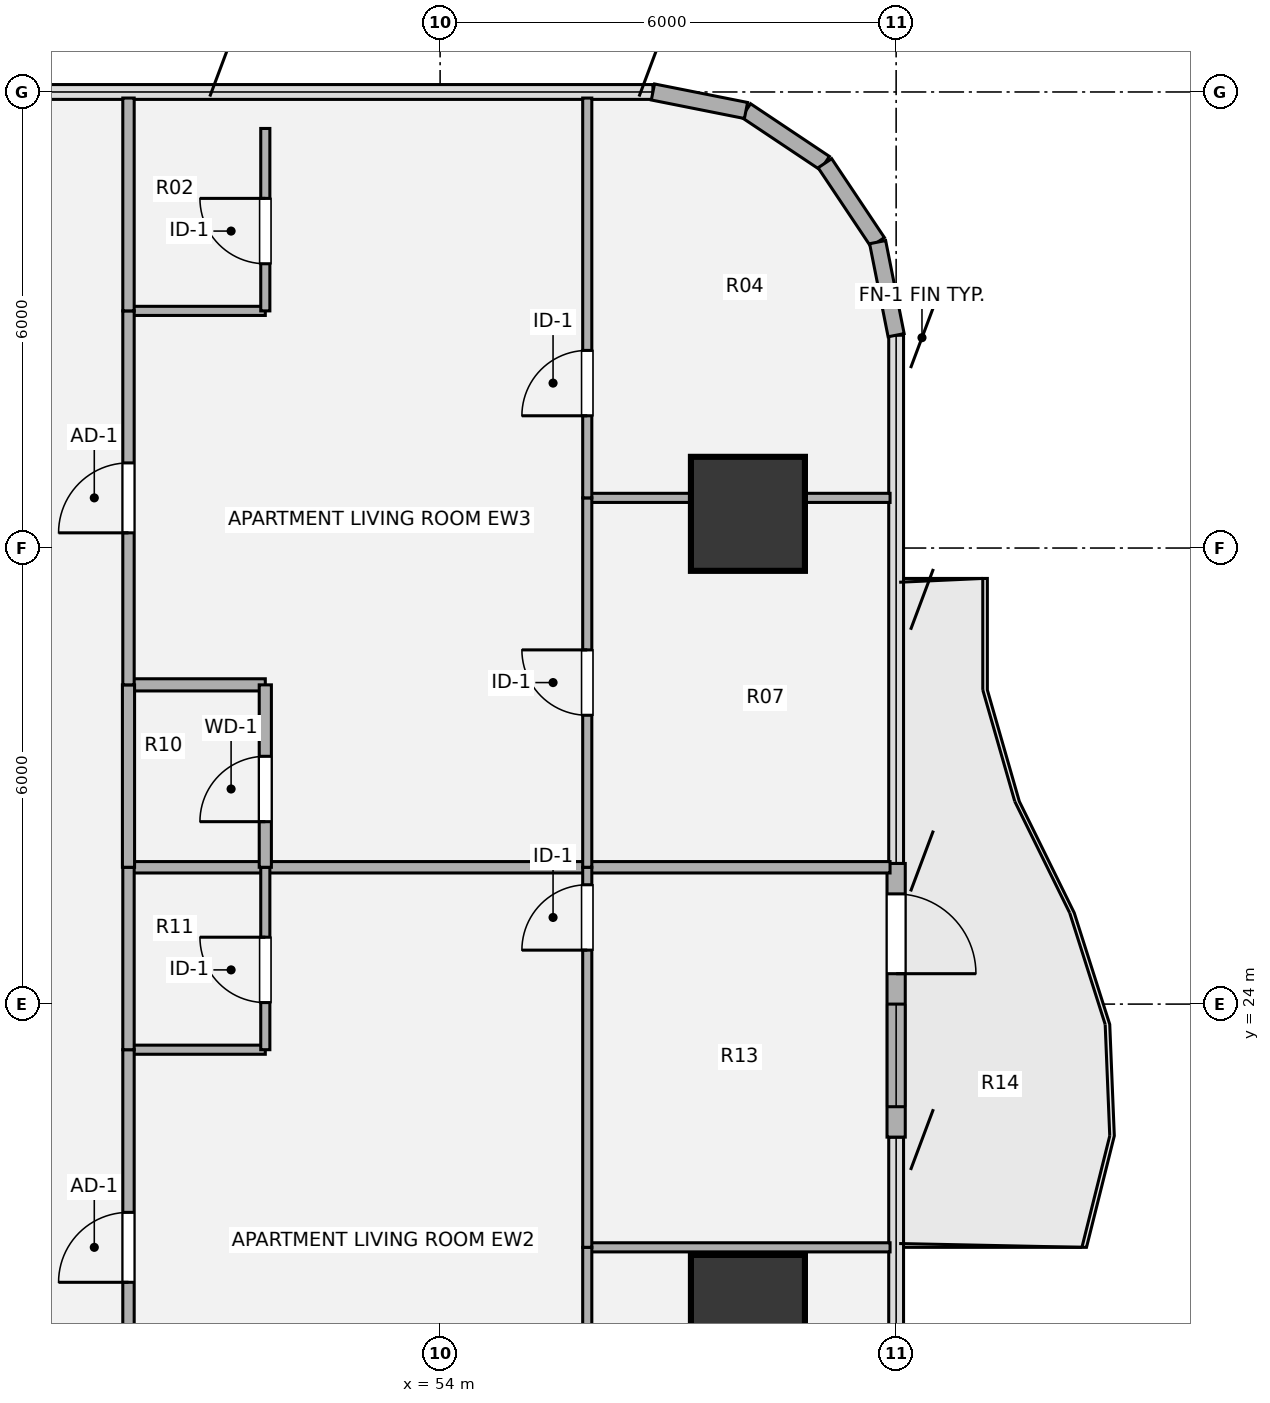
"""IFC4 building model, lengths in metres.
Left out: names, types, materials, properties, quantities, classifications, styles, units other than length and angle.
Written with IfcOpenShell. Run it as: python <this file> out.ifc"""

import sys

from ifc_helpers import new_model, si_unit, direction, frame, frame_2d, origin, origin_2d, place, context, subcontext, project, spatial, rectangle, hollow_circle, extrude, source, transform, mapped, element, fill, save


model = new_model("IFC4")
c1 = context("Model", 3, precision=1e-05, world=origin(), true_north=direction((0.0, 1.0)))
c2 = subcontext(c1, "Body", "Model", "MODEL_VIEW")
j1 = project(units=[si_unit("LENGTHUNIT", "METRE"), si_unit("PLANEANGLEUNIT", "RADIAN")], contexts=[c1])
p1 = place(None, origin())
s1 = spatial("IfcSite", under=j1, at=p1, CompositionType="ELEMENT")
p2 = place(p1, origin())
s2 = spatial("IfcBuilding", under=s1, at=p2, CompositionType="ELEMENT")
p3 = place(p2, frame((0.0, 0.0, 76.14)))
s3 = spatial("IfcBuildingStorey", under=s2, at=p3, CompositionType="ELEMENT", Elevation=76.14)
m1 = source(origin(), c2, "Body", "SweptSolid", [
    extrude(hollow_circle(Radius=0.75, WallThickness=0.05, at=origin_2d()), origin(), (0.0, 0.0, 1.0), 3.372),
])
for number, where, z_axis, x_axis in (
    (1, (58.05, 19.95, 0.0), (0.0, 0.0, 1.0), (1.0, 0.0, 0.0)),
    (2, (58.05, 30.45, 0.0), (0.0, 0.0, 1.0), (1.0, 0.0, 0.0)),
):
    element("IfcColumn", number, at=place(p3, frame(where, z_axis=z_axis, x_axis=x_axis)), inside=s3, PredefinedType="COLUMN", context=c2, shape_type="MappedRepresentation", body=[
        mapped(m1, transform((0.0, 0.0, 0.0), x_axis=(1.0, 0.0, 0.0), y_axis=(0.0, 1.0, 0.0), z_axis=(0.0, 0.0, 1.0), scale=1.0)),
    ])
for number, where, z_axis, x_axis in (
    (3, (58.025, 35.756, 0.0), (0.0, 0.0, 1.0), (0.831, -0.556, 0.0)),
    (4, (59.063, 35.063, 0.0), (0.0, 0.0, 1.0), (0.556, -0.831, 0.0)),
    (5, (59.756, 34.025, 0.0), (0.0, 0.0, 1.0), (0.195, -0.981, 0.0)),
):
    element("IfcWall", number, at=place(p3, frame(where, z_axis=z_axis, x_axis=x_axis)), inside=s3, PredefinedType="SOLIDWALL", context=c2, shape_type="SweptSolid", body=[
        extrude(rectangle(XDim=1.249, YDim=0.215, at=frame_2d((0.624, 0.0))), origin(), (0.0, 0.0, 1.0), 3.372),
    ])
p4 = place(p3, frame((60.0, 25.85, 0.0), z_axis=(0.0, 0.0, 1.0), x_axis=(0.0, -1.0, 0.0)))
e6 = element("IfcWall", 6, at=p4, inside=s3, PredefinedType="SOLIDWALL", context=c2, shape_type="SweptSolid", body=[
    extrude(rectangle(XDim=3.6, YDim=0.24, at=frame_2d((1.8, 0.0))), origin(), (0.0, 0.0, 1.0), 3.372),
])
p5 = place(p4, frame((0.4, 0.0, 0.0)))
e7 = element("IfcOpeningElement", 7, at=p5, cuts=e6, PredefinedType="OPENING", context=c2, shape_type="SweptSolid", body=[
    extrude(rectangle(XDim=1.05, YDim=2.15, at=origin_2d()), frame((0.525, 0.13, 1.075), z_axis=(0.0, -1.0, 0.0), x_axis=(1.0, 0.0, 0.0)), (0.0, 0.0, 1.0), 0.26),
])
p6 = place(p4, frame((1.85, 0.0, 0.85)))
e8 = element("IfcOpeningElement", 8, at=p6, cuts=e6, PredefinedType="OPENING", context=c2, shape_type="SweptSolid", body=[
    extrude(rectangle(XDim=1.35, YDim=1.35, at=origin_2d()), frame((0.675, 0.13, 0.675), z_axis=(0.0, -1.0, 0.0), x_axis=(1.0, 0.0, 0.0)), (0.0, 0.0, 1.0), 0.26),
])
p7 = place(p3, frame((56.8, 36.0, 0.0), z_axis=(0.0, 0.0, 1.0), x_axis=(0.980775717779, -0.195138390419, 0.0)))
e9 = element("IfcWall", 9, at=p7, inside=s3, PredefinedType="SOLIDWALL", context=c2, shape_type="SweptSolid", body=[
    extrude(rectangle(XDim=1.249, YDim=0.215, at=frame_2d((0.624, 0.0))), origin(), (0.0, 0.0, 1.0), 3.372),
])
p8 = place(p3, frame((55.936, 20.8, 0.0), z_axis=(0.0, 0.0, 1.0), x_axis=(1.0, 0.0, 0.0)))
e10 = element("IfcWall", 10, at=p8, inside=s3, PredefinedType="PARTITIONING", context=c2, shape_type="SweptSolid", body=[
    extrude(rectangle(XDim=3.984, YDim=0.12, at=frame_2d((1.992, 0.0))), origin(), (0.0, 0.0, 1.0), 3.342),
])
p9 = place(p3, frame((49.9, 23.4, 0.0), z_axis=(0.0, 0.0, 1.0), x_axis=(1.0, 0.0, 0.0)))
e11 = element("IfcWall", 11, at=p9, inside=s3, PredefinedType="PARTITIONING", context=c2, shape_type="SweptSolid", body=[
    extrude(rectangle(XDim=1.8, YDim=0.12, at=frame_2d((0.9, 0.0))), origin(), (0.0, 0.0, 1.0), 2.824),
])
p10 = place(p3, frame((49.9, 25.8, 0.0), z_axis=(0.0, 0.0, 1.0), x_axis=(1.0, 0.0, 0.0)))
e12 = element("IfcWall", 12, at=p10, inside=s3, PredefinedType="PARTITIONING", context=c2, shape_type="SweptSolid", body=[
    extrude(rectangle(XDim=10.02, YDim=0.15, at=frame_2d((5.01, 0.0))), origin(), (0.0, 0.0, 1.0), 2.824),
])
p11 = place(p3, frame((49.9, 28.2, 0.0), z_axis=(0.0, 0.0, 1.0), x_axis=(1.0, 0.0, 0.0)))
e13 = element("IfcWall", 13, at=p11, inside=s3, PredefinedType="PLUMBINGWALL", context=c2, shape_type="SweptSolid", body=[
    extrude(rectangle(XDim=1.8, YDim=0.16, at=frame_2d((0.9, 0.0))), origin(), (0.0, 0.0, 1.0), 2.824),
])
p12 = place(p3, frame((55.936, 30.66, 0.0), z_axis=(0.0, 0.0, 1.0), x_axis=(1.0, 0.0, 0.0)))
e14 = element("IfcWall", 14, at=p12, inside=s3, PredefinedType="PARTITIONING", context=c2, shape_type="SweptSolid", body=[
    extrude(rectangle(XDim=3.984, YDim=0.12, at=frame_2d((1.992, 0.0))), origin(), (0.0, 0.0, 1.0), 1.857),
])
p13 = place(p3, frame((49.9, 33.12, 0.0), z_axis=(0.0, 0.0, 1.0), x_axis=(1.0, 0.0, 0.0)))
e15 = element("IfcWall", 15, at=p13, inside=s3, PredefinedType="PARTITIONING", context=c2, shape_type="SweptSolid", body=[
    extrude(rectangle(XDim=1.8, YDim=0.12, at=frame_2d((0.9, 0.0))), origin(), (0.0, 0.0, 1.0), 1.857),
])
p14 = place(p3, frame((49.9, 18.2, 0.0), z_axis=(0.0, 0.0, 1.0), x_axis=(0.0, 1.0, 0.0)))
e16 = element("IfcWall", 16, at=p14, inside=s3, PredefinedType="PARTITIONING", context=c2, shape_type="SweptSolid", body=[
    extrude(rectangle(XDim=5.2, YDim=0.15, at=frame_2d((2.6, 0.0))), origin(), (0.0, 0.0, 1.0), 3.342),
])
p15 = place(p14, frame((2.14, 0.0, 0.0)))
e17 = element("IfcOpeningElement", 17, at=p15, cuts=e16, PredefinedType="OPENING", context=c2, shape_type="SweptSolid", body=[
    extrude(rectangle(XDim=0.92, YDim=2.1, at=origin_2d()), frame((0.46, 0.085, 1.05), z_axis=(0.0, -1.0, 0.0), x_axis=(1.0, 0.0, 0.0)), (0.0, 0.0, 1.0), 0.17),
])
p16 = place(p3, frame((49.9, 23.4, 0.0), z_axis=(0.0, 0.0, 1.0), x_axis=(0.0, 1.0, 0.0)))
e18 = element("IfcWall", 18, at=p16, inside=s3, PredefinedType="PARTITIONING", context=c2, shape_type="SweptSolid", body=[
    extrude(rectangle(XDim=2.4, YDim=0.15, at=frame_2d((1.2, 0.0))), origin(), (0.0, 0.0, 1.0), 3.342),
])
p17 = place(p3, frame((49.9, 25.8, 0.0), z_axis=(0.0, 0.0, 1.0), x_axis=(0.0, 1.0, 0.0)))
e19 = element("IfcWall", 19, at=p17, inside=s3, PredefinedType="PLUMBINGWALL", context=c2, shape_type="SweptSolid", body=[
    extrude(rectangle(XDim=2.4, YDim=0.16, at=frame_2d((1.2, 0.0))), origin(), (0.0, 0.0, 1.0), 3.342),
])
p18 = place(p3, frame((49.9, 28.2, 0.0), z_axis=(0.0, 0.0, 1.0), x_axis=(0.0, 1.0, 0.0)))
e20 = element("IfcWall", 20, at=p18, inside=s3, PredefinedType="PARTITIONING", context=c2, shape_type="SweptSolid", body=[
    extrude(rectangle(XDim=4.92, YDim=0.15, at=frame_2d((2.46, 0.0))), origin(), (0.0, 0.0, 1.0), 3.342),
])
p19 = place(p18, frame((2.0, 0.0, 0.0)))
e21 = element("IfcOpeningElement", 21, at=p19, cuts=e20, PredefinedType="OPENING", context=c2, shape_type="SweptSolid", body=[
    extrude(rectangle(XDim=0.92, YDim=2.1, at=origin_2d()), frame((0.46, 0.085, 1.05), z_axis=(0.0, -1.0, 0.0), x_axis=(1.0, 0.0, 0.0)), (0.0, 0.0, 1.0), 0.17),
])
p20 = place(p3, frame((49.9, 33.12, 0.0), z_axis=(0.0, 0.0, 1.0), x_axis=(0.0, 1.0, 0.0)))
e22 = element("IfcWall", 22, at=p20, inside=s3, PredefinedType="PARTITIONING", context=c2, shape_type="SweptSolid", body=[
    extrude(rectangle(XDim=2.8, YDim=0.15, at=frame_2d((1.4, 0.0))), origin(), (0.0, 0.0, 1.0), 3.342),
])
p21 = place(p3, frame((51.7, 23.4, 0.0), z_axis=(0.0, 0.0, 1.0), x_axis=(0.0, 1.0, 0.0)))
e23 = element("IfcWall", 23, at=p21, inside=s3, PredefinedType="PARTITIONING", context=c2, shape_type="SweptSolid", body=[
    extrude(rectangle(XDim=2.4, YDim=0.12, at=frame_2d((1.2, 0.0))), origin(), (0.0, 0.0, 1.0), 3.342),
])
p22 = place(p21, frame((0.62, 0.0, 0.0)))
e24 = element("IfcOpeningElement", 24, at=p22, cuts=e23, PredefinedType="OPENING", context=c2, shape_type="SweptSolid", body=[
    extrude(rectangle(XDim=0.86, YDim=2.1, at=origin_2d()), frame((0.43, 0.07, 1.05), z_axis=(0.0, -1.0, 0.0), x_axis=(1.0, 0.0, 0.0)), (0.0, 0.0, 1.0), 0.14),
])
p23 = place(p3, frame((51.7, 25.8, 0.0), z_axis=(0.0, 0.0, 1.0), x_axis=(0.0, 1.0, 0.0)))
e25 = element("IfcWall", 25, at=p23, inside=s3, PredefinedType="PLUMBINGWALL", context=c2, shape_type="SweptSolid", body=[
    extrude(rectangle(XDim=2.4, YDim=0.16, at=frame_2d((1.2, 0.0))), origin(), (0.0, 0.0, 1.0), 3.342),
])
p24 = place(p23, frame((0.6, 0.0, 0.0)))
e26 = element("IfcOpeningElement", 26, at=p24, cuts=e25, PredefinedType="OPENING", context=c2, shape_type="SweptSolid", body=[
    extrude(rectangle(XDim=0.86, YDim=2.1, at=origin_2d()), frame((0.43, 0.09, 1.05), z_axis=(0.0, -1.0, 0.0), x_axis=(1.0, 0.0, 0.0)), (0.0, 0.0, 1.0), 0.18),
])
p25 = place(p3, frame((51.7, 33.12, 0.0), z_axis=(0.0, 0.0, 1.0), x_axis=(0.0, 1.0, 0.0)))
e27 = element("IfcWall", 27, at=p25, inside=s3, PredefinedType="PARTITIONING", context=c2, shape_type="SweptSolid", body=[
    extrude(rectangle(XDim=2.4, YDim=0.12, at=frame_2d((1.2, 0.0))), origin(), (0.0, 0.0, 1.0), 3.342),
])
p26 = place(p25, frame((0.62, 0.0, 0.0)))
e28 = element("IfcOpeningElement", 28, at=p26, cuts=e27, PredefinedType="OPENING", context=c2, shape_type="SweptSolid", body=[
    extrude(rectangle(XDim=0.86, YDim=2.1, at=origin_2d()), frame((0.43, 0.07, 1.05), z_axis=(0.0, -1.0, 0.0), x_axis=(1.0, 0.0, 0.0)), (0.0, 0.0, 1.0), 0.14),
])
p27 = place(p3, frame((55.936, 15.8, 0.0), z_axis=(0.0, 0.0, 1.0), x_axis=(0.0, 1.0, 0.0)))
e29 = element("IfcWall", 29, at=p27, inside=s3, PredefinedType="PARTITIONING", context=c2, shape_type="SweptSolid", body=[
    extrude(rectangle(XDim=5.0, YDim=0.12, at=frame_2d((2.5, 0.0))), origin(), (0.0, 0.0, 1.0), 3.342),
])
p28 = place(p27, frame((2.07, 0.0, 0.0)))
e30 = element("IfcOpeningElement", 30, at=p28, cuts=e29, PredefinedType="OPENING", context=c2, shape_type="SweptSolid", body=[
    extrude(rectangle(XDim=0.86, YDim=2.1, at=origin_2d()), frame((0.43, 0.07, 1.05), z_axis=(0.0, -1.0, 0.0), x_axis=(1.0, 0.0, 0.0)), (0.0, 0.0, 1.0), 0.14),
])
p29 = place(p3, frame((55.936, 20.8, 0.0), z_axis=(0.0, 0.0, 1.0), x_axis=(0.0, 1.0, 0.0)))
e31 = element("IfcWall", 31, at=p29, inside=s3, PredefinedType="PARTITIONING", context=c2, shape_type="SweptSolid", body=[
    extrude(rectangle(XDim=5.0, YDim=0.12, at=frame_2d((2.5, 0.0))), origin(), (0.0, 0.0, 1.0), 3.342),
])
p30 = place(p29, frame((3.91, 0.0, 0.0)))
e32 = element("IfcOpeningElement", 32, at=p30, cuts=e31, PredefinedType="OPENING", context=c2, shape_type="SweptSolid", body=[
    extrude(rectangle(XDim=0.86, YDim=2.1, at=origin_2d()), frame((0.43, 0.07, 1.05), z_axis=(0.0, -1.0, 0.0), x_axis=(1.0, 0.0, 0.0)), (0.0, 0.0, 1.0), 0.14),
])
p31 = place(p3, frame((55.936, 25.8, 0.0), z_axis=(0.0, 0.0, 1.0), x_axis=(0.0, 1.0, 0.0)))
e33 = element("IfcWall", 33, at=p31, inside=s3, PredefinedType="PARTITIONING", context=c2, shape_type="SweptSolid", body=[
    extrude(rectangle(XDim=4.86, YDim=0.12, at=frame_2d((2.43, 0.0))), origin(), (0.0, 0.0, 1.0), 3.342),
])
p32 = place(p31, frame((2.0, 0.0, 0.0)))
e34 = element("IfcOpeningElement", 34, at=p32, cuts=e33, PredefinedType="OPENING", context=c2, shape_type="SweptSolid", body=[
    extrude(rectangle(XDim=0.86, YDim=2.1, at=origin_2d()), frame((0.43, 0.07, 1.05), z_axis=(0.0, -1.0, 0.0), x_axis=(1.0, 0.0, 0.0)), (0.0, 0.0, 1.0), 0.14),
])
p33 = place(p3, frame((55.936, 30.66, 0.0), z_axis=(0.0, 0.0, 1.0), x_axis=(0.0, 1.0, 0.0)))
e35 = element("IfcWall", 35, at=p33, inside=s3, PredefinedType="PARTITIONING", context=c2, shape_type="SweptSolid", body=[
    extrude(rectangle(XDim=5.26, YDim=0.12, at=frame_2d((2.63, 0.0))), origin(), (0.0, 0.0, 1.0), 3.342),
])
p34 = place(p33, frame((1.08, 0.0, 0.0)))
e36 = element("IfcOpeningElement", 36, at=p34, cuts=e35, PredefinedType="OPENING", context=c2, shape_type="SweptSolid", body=[
    extrude(rectangle(XDim=0.86, YDim=2.1, at=origin_2d()), frame((0.43, 0.07, 1.05), z_axis=(0.0, -1.0, 0.0), x_axis=(1.0, 0.0, 0.0)), (0.0, 0.0, 1.0), 0.14),
])
m2 = source(origin(), c2, "Body", "SweptSolid", [
    extrude(rectangle(XDim=1.05, YDim=2.15, at=origin_2d()), frame((0.525, 0.025, 1.075), z_axis=(0.0, -1.0, 0.0), x_axis=(1.0, 0.0, 0.0)), (0.0, 0.0, 1.0), 0.05),
])
p35 = place(p5, origin())
e37 = element("IfcDoor", 37, at=p35, inside=s3, OperationType="SINGLE_SWING_RIGHT", PredefinedType="DOOR", context=c2, shape_type="MappedRepresentation", body=[
    mapped(m2, transform((0.0, 0.0, 0.0), x_axis=(1.0, 0.0, 0.0), y_axis=(0.0, 1.0, 0.0), z_axis=(0.0, 0.0, 1.0), scale=1.0)),
])
fill(e7, e37)
m3 = source(origin(), c2, "Body", "SweptSolid", [
    extrude(rectangle(XDim=1.35, YDim=1.35, at=origin_2d()), frame((0.675, 0.03, 0.675), z_axis=(0.0, -1.0, 0.0), x_axis=(1.0, 0.0, 0.0)), (0.0, 0.0, 1.0), 0.06),
])
p36 = place(p6, origin())
e38 = element("IfcWindow", 38, at=p36, inside=s3, PartitioningType="SINGLE_PANEL", PredefinedType="WINDOW", context=c2, shape_type="MappedRepresentation", body=[
    mapped(m3, transform((0.0, 0.0, 0.0), x_axis=(1.0, 0.0, 0.0), y_axis=(0.0, 1.0, 0.0), z_axis=(0.0, 0.0, 1.0), scale=1.0)),
])
fill(e8, e38)
m4 = source(origin(), c2, "Body", "SweptSolid", [
    extrude(rectangle(XDim=0.92, YDim=2.1, at=origin_2d()), frame((0.46, 0.025, 1.05), z_axis=(0.0, -1.0, 0.0), x_axis=(1.0, 0.0, 0.0)), (0.0, 0.0, 1.0), 0.05),
])
p37 = place(p15, origin())
e39 = element("IfcDoor", 39, at=p37, inside=s3, OperationType="SINGLE_SWING_LEFT", PredefinedType="DOOR", context=c2, shape_type="MappedRepresentation", body=[
    mapped(m4, transform((0.0, 0.0, 0.0), x_axis=(1.0, 0.0, 0.0), y_axis=(0.0, 1.0, 0.0), z_axis=(0.0, 0.0, 1.0), scale=1.0)),
])
fill(e17, e39)
p38 = place(p19, origin())
e40 = element("IfcDoor", 40, at=p38, inside=s3, OperationType="SINGLE_SWING_LEFT", PredefinedType="DOOR", context=c2, shape_type="MappedRepresentation", body=[
    mapped(m4, transform((0.0, 0.0, 0.0), x_axis=(1.0, 0.0, 0.0), y_axis=(0.0, 1.0, 0.0), z_axis=(0.0, 0.0, 1.0), scale=1.0)),
])
fill(e21, e40)
m5 = source(origin(), c2, "Body", "SweptSolid", [
    extrude(rectangle(XDim=0.86, YDim=2.1, at=origin_2d()), frame((0.43, 0.025, 1.05), z_axis=(0.0, -1.0, 0.0), x_axis=(1.0, 0.0, 0.0)), (0.0, 0.0, 1.0), 0.05),
])
p39 = place(p22, origin())
e41 = element("IfcDoor", 41, at=p39, inside=s3, OperationType="SINGLE_SWING_RIGHT", PredefinedType="DOOR", context=c2, shape_type="MappedRepresentation", body=[
    mapped(m5, transform((0.0, 0.0, 0.0), x_axis=(1.0, 0.0, 0.0), y_axis=(0.0, 1.0, 0.0), z_axis=(0.0, 0.0, 1.0), scale=1.0)),
])
fill(e24, e41)
m6 = source(origin(), c2, "Body", "SweptSolid", [
    extrude(rectangle(XDim=0.86, YDim=2.1, at=origin_2d()), frame((0.43, 0.025, 1.05), z_axis=(0.0, -1.0, 0.0), x_axis=(1.0, 0.0, 0.0)), (0.0, 0.0, 1.0), 0.05),
])
p40 = place(p24, origin())
e42 = element("IfcDoor", 42, at=p40, inside=s3, OperationType="SINGLE_SWING_LEFT", PredefinedType="DOOR", context=c2, shape_type="MappedRepresentation", body=[
    mapped(m6, transform((0.0, 0.0, 0.0), x_axis=(1.0, 0.0, 0.0), y_axis=(0.0, 1.0, 0.0), z_axis=(0.0, 0.0, 1.0), scale=1.0)),
])
fill(e26, e42)
p41 = place(p26, origin())
e43 = element("IfcDoor", 43, at=p41, inside=s3, OperationType="SINGLE_SWING_RIGHT", PredefinedType="DOOR", context=c2, shape_type="MappedRepresentation", body=[
    mapped(m5, transform((0.0, 0.0, 0.0), x_axis=(1.0, 0.0, 0.0), y_axis=(0.0, 1.0, 0.0), z_axis=(0.0, 0.0, 1.0), scale=1.0)),
])
fill(e28, e43)
p42 = place(p30, origin())
e44 = element("IfcDoor", 44, at=p42, inside=s3, OperationType="SINGLE_SWING_LEFT", PredefinedType="DOOR", context=c2, shape_type="MappedRepresentation", body=[
    mapped(m5, transform((0.0, 0.0, 0.0), x_axis=(1.0, 0.0, 0.0), y_axis=(0.0, 1.0, 0.0), z_axis=(0.0, 0.0, 1.0), scale=1.0)),
])
fill(e32, e44)
p43 = place(p32, origin())
e45 = element("IfcDoor", 45, at=p43, inside=s3, OperationType="SINGLE_SWING_RIGHT", PredefinedType="DOOR", context=c2, shape_type="MappedRepresentation", body=[
    mapped(m5, transform((0.0, 0.0, 0.0), x_axis=(1.0, 0.0, 0.0), y_axis=(0.0, 1.0, 0.0), z_axis=(0.0, 0.0, 1.0), scale=1.0)),
])
fill(e34, e45)
p44 = place(p34, origin())
e46 = element("IfcDoor", 46, at=p44, inside=s3, OperationType="SINGLE_SWING_LEFT", PredefinedType="DOOR", context=c2, shape_type="MappedRepresentation", body=[
    mapped(m5, transform((0.0, 0.0, 0.0), x_axis=(1.0, 0.0, 0.0), y_axis=(0.0, 1.0, 0.0), z_axis=(0.0, 0.0, 1.0), scale=1.0)),
])
fill(e36, e46)
save(model, sys.argv[1])
